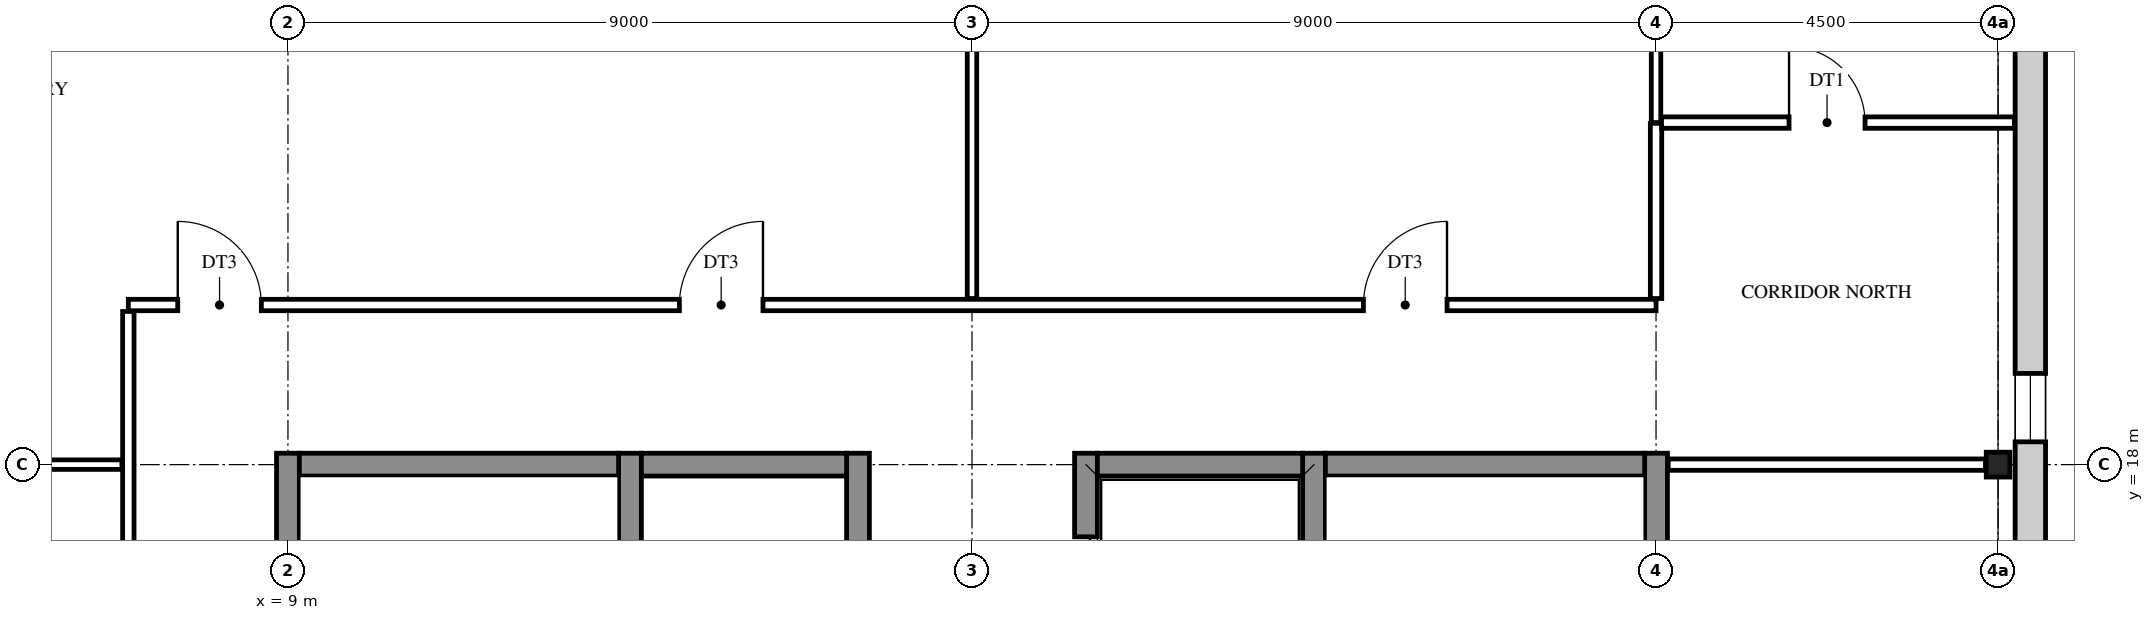
"""IFC4 building model, lengths in metres.
Left out: names, types, materials, properties, quantities, classifications, styles, units other than length and angle.
Written with IfcOpenShell. Run it as: python <this file> out.ifc"""

import sys

from ifc_helpers import new_model, si_unit, direction, frame, frame_2d, origin, origin_2d, place, context, subcontext, project, spatial, rectangle, i_section, extrude, element, fill, save


model = new_model("IFC4")
c1 = context("Model", 3, precision=1e-05, world=origin(), true_north=direction((0.0, 1.0)))
c2 = subcontext(c1, "Body", "Model", "MODEL_VIEW")
j1 = project(units=[si_unit("LENGTHUNIT", "METRE"), si_unit("PLANEANGLEUNIT", "RADIAN")], contexts=[c1])
p1 = place(None, origin())
s1 = spatial("IfcSite", under=j1, at=p1, CompositionType="ELEMENT")
p2 = place(p1, origin())
s2 = spatial("IfcBuilding", under=s1, at=p2, CompositionType="ELEMENT")
p3 = place(p2, frame((0.0, 0.0, 40.2)))
s3 = spatial("IfcBuildingStorey", under=s2, at=p3, CompositionType="ELEMENT", Elevation=40.2)
p4 = place(p3, frame((31.5, 18.0, 0.0), z_axis=(0.0, 0.0, 1.0), x_axis=(1.0, 0.0, 0.0)))
e1 = element("IfcColumn", 1, at=p4, inside=s3, PredefinedType="COLUMN", context=c2, shape_type="SweptSolid", body=[
    extrude(i_section(OverallWidth=0.311, OverallDepth=0.327, WebThickness=0.016, FlangeThickness=0.025, FilletRadius=0.017, at=origin_2d()), origin(), (0.0, 0.0, 1.0), 4.2),
])
for number, where, z_axis, x_axis in (
    (2, (9.0, 8.85, 0.0), (0.0, 0.0, 1.0), (0.0, 1.0, 0.0)),
    (3, (13.5, 8.85, 0.0), (0.0, 0.0, 1.0), (0.0, 1.0, 0.0)),
):
    element("IfcWall", number, at=place(p3, frame(where, z_axis=z_axis, x_axis=x_axis)), inside=s3, PredefinedType="SHEAR", context=c2, shape_type="SweptSolid", body=[
        extrude(rectangle(XDim=9.3, YDim=0.3, at=frame_2d((4.65, 0.0))), origin(), (0.0, 0.0, 1.0), 4.2),
    ])
p5 = place(p3, frame((16.5, 8.85, 0.0), z_axis=(0.0, 0.0, 1.0), x_axis=(0.0, 1.0, 0.0)))
e4 = element("IfcWall", 4, at=p5, inside=s3, PredefinedType="SHEAR", context=c2, shape_type="SweptSolid", body=[
    extrude(rectangle(XDim=9.3, YDim=0.3, at=frame_2d((4.65, 0.0))), origin(), (0.0, 0.0, 1.0), 4.2),
])
p6 = place(p5, frame((1.1, 0.0, 0.0)))
e5 = element("IfcOpeningElement", 5, at=p6, cuts=e4, PredefinedType="OPENING", context=c2, shape_type="SweptSolid", body=[
    extrude(rectangle(XDim=1.1, YDim=2.1, at=frame_2d((0.55, 1.05))), frame((0.0, 0.16, 0.0), z_axis=(0.0, -1.0, 0.0), x_axis=(1.0, 0.0, 0.0)), (0.0, 0.0, 1.0), 0.32),
])
p7 = place(p5, frame((4.1, 0.0, 0.0)))
e6 = element("IfcOpeningElement", 6, at=p7, cuts=e4, PredefinedType="OPENING", context=c2, shape_type="SweptSolid", body=[
    extrude(rectangle(XDim=1.1, YDim=2.1, at=frame_2d((0.55, 1.05))), frame((0.0, 0.16, 0.0), z_axis=(0.0, -1.0, 0.0), x_axis=(1.0, 0.0, 0.0)), (0.0, 0.0, 1.0), 0.32),
])
p8 = place(p3, frame((19.5, 8.85, 0.0), z_axis=(0.0, 0.0, 1.0), x_axis=(0.0, 1.0, 0.0)))
e7 = element("IfcWall", 7, at=p8, inside=s3, PredefinedType="SHEAR", context=c2, shape_type="SweptSolid", body=[
    extrude(rectangle(XDim=9.3, YDim=0.3, at=frame_2d((4.65, 0.0))), origin(), (0.0, 0.0, 1.0), 4.2),
])
p9 = place(p8, frame((3.95, 0.0, 0.0)))
e8 = element("IfcOpeningElement", 8, at=p9, cuts=e7, PredefinedType="OPENING", context=c2, shape_type="SweptSolid", body=[
    extrude(rectangle(XDim=1.4, YDim=2.1, at=frame_2d((0.7, 1.05))), frame((0.0, 0.16, 0.0), z_axis=(0.0, -1.0, 0.0), x_axis=(1.0, 0.0, 0.0)), (0.0, 0.0, 1.0), 0.32),
])
p10 = place(p8, frame((7.1, 0.0, 0.0)))
e9 = element("IfcOpeningElement", 9, at=p10, cuts=e7, PredefinedType="OPENING", context=c2, shape_type="SweptSolid", body=[
    extrude(rectangle(XDim=1.1, YDim=2.1, at=frame_2d((0.55, 1.05))), frame((0.0, 0.16, 0.0), z_axis=(0.0, -1.0, 0.0), x_axis=(1.0, 0.0, 0.0)), (0.0, 0.0, 1.0), 0.32),
])
for number, where, z_axis, x_axis in (
    (10, (22.5, 8.85, 0.0), (0.0, 0.0, 1.0), (0.0, 1.0, 0.0)),
    (11, (27.0, 8.85, 0.0), (0.0, 0.0, 1.0), (0.0, 1.0, 0.0)),
):
    element("IfcWall", number, at=place(p3, frame(where, z_axis=z_axis, x_axis=x_axis)), inside=s3, PredefinedType="SHEAR", context=c2, shape_type="SweptSolid", body=[
        extrude(rectangle(XDim=9.3, YDim=0.3, at=frame_2d((4.65, 0.0))), origin(), (0.0, 0.0, 1.0), 4.2),
    ])
p11 = place(p3, frame((9.15, 18.0, 0.0), z_axis=(0.0, 0.0, 1.0), x_axis=(1.0, 0.0, 0.0)))
e12 = element("IfcWall", 12, at=p11, inside=s3, PredefinedType="SHEAR", context=c2, shape_type="SweptSolid", body=[
    extrude(rectangle(XDim=4.2, YDim=0.3, at=frame_2d((2.1, 0.0))), origin(), (0.0, 0.0, 1.0), 4.2),
])
for number, where, z_axis, x_axis in (
    (13, (13.65, 18.0, 0.0), (0.0, 0.0, 1.0), (1.0, 0.0, 0.0)),
    (14, (19.65, 18.0, 0.0), (0.0, 0.0, 1.0), (1.0, 0.0, 0.0)),
):
    element("IfcWall", number, at=place(p3, frame(where, z_axis=z_axis, x_axis=x_axis)), inside=s3, PredefinedType="SHEAR", context=c2, shape_type="SweptSolid", body=[
        extrude(rectangle(XDim=2.7, YDim=0.3, at=frame_2d((1.35, 0.0))), origin(), (0.0, 0.0, 1.0), 4.2),
    ])
p12 = place(p3, frame((22.65, 18.0, 0.0), z_axis=(0.0, 0.0, 1.0), x_axis=(1.0, 0.0, 0.0)))
e15 = element("IfcWall", 15, at=p12, inside=s3, PredefinedType="SHEAR", context=c2, shape_type="SweptSolid", body=[
    extrude(rectangle(XDim=4.2, YDim=0.3, at=frame_2d((2.1, 0.0))), origin(), (0.0, 0.0, 1.0), 4.2),
])
p13 = place(p3, frame((31.925, 27.225, 0.0), z_axis=(0.0, 0.0, 1.0), x_axis=(0.0, -1.0, 0.0)))
e16 = element("IfcWall", 16, at=p13, inside=s3, PredefinedType="STANDARD", context=c2, shape_type="SweptSolid", body=[
    extrude(rectangle(XDim=27.45, YDim=0.4, at=frame_2d((13.725, 0.0))), origin(), (0.0, 0.0, 1.0), 4.2),
])
p14 = place(p13, frame((26.025, 0.0, 0.9)))
e17 = element("IfcOpeningElement", 17, at=p14, cuts=e16, PredefinedType="OPENING", context=c2, shape_type="SweptSolid", body=[
    extrude(rectangle(XDim=0.9, YDim=2.0, at=frame_2d((0.45, 1.0))), frame((0.0, 0.21, 0.0), z_axis=(0.0, -1.0, 0.0), x_axis=(1.0, 0.0, 0.0)), (0.0, 0.0, 1.0), 0.42),
])
p15 = place(p13, frame((18.525, 0.0, 0.9)))
e18 = element("IfcOpeningElement", 18, at=p15, cuts=e16, PredefinedType="OPENING", context=c2, shape_type="SweptSolid", body=[
    extrude(rectangle(XDim=0.9, YDim=2.0, at=frame_2d((0.45, 1.0))), frame((0.0, 0.21, 0.0), z_axis=(0.0, -1.0, 0.0), x_axis=(1.0, 0.0, 0.0)), (0.0, 0.0, 1.0), 0.42),
])
p16 = place(p13, frame((15.675, 0.0, 1.6)))
e19 = element("IfcOpeningElement", 19, at=p16, cuts=e16, PredefinedType="OPENING", context=c2, shape_type="SweptSolid", body=[
    extrude(rectangle(XDim=0.6, YDim=0.9, at=frame_2d((0.3, 0.45))), frame((0.0, 0.21, 0.0), z_axis=(0.0, -1.0, 0.0), x_axis=(1.0, 0.0, 0.0)), (0.0, 0.0, 1.0), 0.42),
])
p17 = place(p13, frame((11.175, 0.0, 1.6)))
e20 = element("IfcOpeningElement", 20, at=p17, cuts=e16, PredefinedType="OPENING", context=c2, shape_type="SweptSolid", body=[
    extrude(rectangle(XDim=0.6, YDim=0.9, at=frame_2d((0.3, 0.45))), frame((0.0, 0.21, 0.0), z_axis=(0.0, -1.0, 0.0), x_axis=(1.0, 0.0, 0.0)), (0.0, 0.0, 1.0), 0.42),
])
p18 = place(p13, frame((8.025, 0.0, 0.9)))
e21 = element("IfcOpeningElement", 21, at=p18, cuts=e16, PredefinedType="OPENING", context=c2, shape_type="SweptSolid", body=[
    extrude(rectangle(XDim=0.9, YDim=2.0, at=frame_2d((0.45, 1.0))), frame((0.0, 0.21, 0.0), z_axis=(0.0, -1.0, 0.0), x_axis=(1.0, 0.0, 0.0)), (0.0, 0.0, 1.0), 0.42),
])
p19 = place(p13, frame((0.525, 0.0, 0.9)))
e22 = element("IfcOpeningElement", 22, at=p19, cuts=e16, PredefinedType="OPENING", context=c2, shape_type="SweptSolid", body=[
    extrude(rectangle(XDim=0.9, YDim=2.0, at=frame_2d((0.45, 1.0))), frame((0.0, 0.21, 0.0), z_axis=(0.0, -1.0, 0.0), x_axis=(1.0, 0.0, 0.0)), (0.0, 0.0, 1.0), 0.42),
])
p20 = place(p3, frame((6.9, 6.985, 0.0), z_axis=(0.0, 0.0, 1.0), x_axis=(0.0, 1.0, 0.0)))
e23 = element("IfcWall", 23, at=p20, inside=s3, PredefinedType="PARTITIONING", context=c2, shape_type="SweptSolid", body=[
    extrude(rectangle(XDim=13.03, YDim=0.15, at=frame_2d((6.515, 0.0))), origin(), (0.0, 0.0, 1.0), 3.537),
])
p21 = place(p20, frame((0.465, 0.0, 0.0)))
e24 = element("IfcOpeningElement", 24, at=p21, cuts=e23, PredefinedType="OPENING", context=c2, shape_type="SweptSolid", body=[
    extrude(rectangle(XDim=1.0, YDim=2.1, at=frame_2d((0.5, 1.05))), frame((0.0, 0.085, 0.0), z_axis=(0.0, -1.0, 0.0), x_axis=(1.0, 0.0, 0.0)), (0.0, 0.0, 1.0), 0.17),
])
p22 = place(p20, frame((3.715, 0.0, 0.0)))
e25 = element("IfcOpeningElement", 25, at=p22, cuts=e23, PredefinedType="OPENING", context=c2, shape_type="SweptSolid", body=[
    extrude(rectangle(XDim=1.1, YDim=2.1, at=frame_2d((0.55, 1.05))), frame((0.0, 0.085, 0.0), z_axis=(0.0, -1.0, 0.0), x_axis=(1.0, 0.0, 0.0)), (0.0, 0.0, 1.0), 0.17),
])
p23 = place(p20, frame((8.265, 0.0, 0.0)))
e26 = element("IfcOpeningElement", 26, at=p23, cuts=e23, PredefinedType="OPENING", context=c2, shape_type="SweptSolid", body=[
    extrude(rectangle(XDim=1.0, YDim=2.1, at=frame_2d((0.5, 1.05))), frame((0.0, 0.085, 0.0), z_axis=(0.0, -1.0, 0.0), x_axis=(1.0, 0.0, 0.0)), (0.0, 0.0, 1.0), 0.17),
])
p24 = place(p3, frame((18.0, 20.185, 0.0), z_axis=(0.0, 0.0, 1.0), x_axis=(0.0, 1.0, 0.0)))
e27 = element("IfcWall", 27, at=p24, inside=s3, PredefinedType="PARTITIONING", context=c2, shape_type="SweptSolid", body=[
    extrude(rectangle(XDim=6.641, YDim=0.125, at=frame_2d((3.321, 0.0))), origin(), (0.0, 0.0, 1.0), 3.537),
])
p25 = place(p3, frame((27.0, 20.185, 0.0), z_axis=(0.0, 0.0, 1.0), x_axis=(0.0, 1.0, 0.0)))
e28 = element("IfcWall", 28, at=p25, inside=s3, PredefinedType="PARTITIONING", context=c2, shape_type="SweptSolid", body=[
    extrude(rectangle(XDim=2.305, YDim=0.15, at=frame_2d((1.152, 0.0))), origin(), (0.0, 0.0, 1.0), 3.537),
])
p26 = place(p3, frame((27.0, 22.5, 0.0), z_axis=(0.0, 0.0, 1.0), x_axis=(0.0, 1.0, 0.0)))
e29 = element("IfcWall", 29, at=p26, inside=s3, PredefinedType="PARTITIONING", context=c2, shape_type="SweptSolid", body=[
    extrude(rectangle(XDim=4.326, YDim=0.125, at=frame_2d((2.163, 0.0))), origin(), (0.0, 0.0, 1.0), 3.537),
])
p27 = place(p3, frame((0.166, 18.0, 0.0), z_axis=(0.0, 0.0, 1.0), x_axis=(1.0, 0.0, 0.0)))
e30 = element("IfcWall", 30, at=p27, inside=s3, PredefinedType="PARTITIONING", context=c2, shape_type="SweptSolid", body=[
    extrude(rectangle(XDim=6.649, YDim=0.125, at=frame_2d((3.325, 0.0))), origin(), (0.0, 0.0, 1.0), 3.537),
])
p28 = place(p3, frame((27.16, 18.0, 0.0), z_axis=(0.0, 0.0, 1.0), x_axis=(1.0, 0.0, 0.0)))
e31 = element("IfcWall", 31, at=p28, inside=s3, PredefinedType="PARTITIONING", context=c2, shape_type="SweptSolid", body=[
    extrude(rectangle(XDim=4.175, YDim=0.15, at=frame_2d((2.087, 0.0))), origin(), (0.0, 0.0, 1.0), 3.537),
])
p29 = place(p3, frame((6.9, 20.1, 0.0), z_axis=(0.0, 0.0, 1.0), x_axis=(1.0, 0.0, 0.0)))
e32 = element("IfcWall", 32, at=p29, inside=s3, PredefinedType="PARTITIONING", context=c2, shape_type="SweptSolid", body=[
    extrude(rectangle(XDim=20.1, YDim=0.15, at=frame_2d((10.05, 0.0))), origin(), (0.0, 0.0, 1.0), 3.537),
])
p30 = place(p29, frame((7.25, 0.0, 0.0)))
e33 = element("IfcOpeningElement", 33, at=p30, cuts=e32, PredefinedType="OPENING", context=c2, shape_type="SweptSolid", body=[
    extrude(rectangle(XDim=1.1, YDim=2.1, at=frame_2d((0.55, 1.05))), frame((0.0, 0.085, 0.0), z_axis=(0.0, -1.0, 0.0), x_axis=(1.0, 0.0, 0.0)), (0.0, 0.0, 1.0), 0.17),
])
p31 = place(p29, frame((0.65, 0.0, 0.0)))
e34 = element("IfcOpeningElement", 34, at=p31, cuts=e32, PredefinedType="OPENING", context=c2, shape_type="SweptSolid", body=[
    extrude(rectangle(XDim=1.1, YDim=2.1, at=frame_2d((0.55, 1.05))), frame((0.0, 0.085, 0.0), z_axis=(0.0, -1.0, 0.0), x_axis=(1.0, 0.0, 0.0)), (0.0, 0.0, 1.0), 0.17),
])
p32 = place(p29, frame((16.25, 0.0, 0.0)))
e35 = element("IfcOpeningElement", 35, at=p32, cuts=e32, PredefinedType="OPENING", context=c2, shape_type="SweptSolid", body=[
    extrude(rectangle(XDim=1.1, YDim=2.1, at=frame_2d((0.55, 1.05))), frame((0.0, 0.085, 0.0), z_axis=(0.0, -1.0, 0.0), x_axis=(1.0, 0.0, 0.0)), (0.0, 0.0, 1.0), 0.17),
])
p33 = place(p3, frame((27.073, 22.5, 0.0), z_axis=(0.0, 0.0, 1.0), x_axis=(1.0, 0.0, 0.0)))
e36 = element("IfcWall", 36, at=p33, inside=s3, PredefinedType="PARTITIONING", context=c2, shape_type="SweptSolid", body=[
    extrude(rectangle(XDim=4.643, YDim=0.15, at=frame_2d((2.321, 0.0))), origin(), (0.0, 0.0, 1.0), 3.537),
])
p34 = place(p33, frame((1.677, 0.0, 0.0)))
e37 = element("IfcOpeningElement", 37, at=p34, cuts=e36, PredefinedType="OPENING", context=c2, shape_type="SweptSolid", body=[
    extrude(rectangle(XDim=1.0, YDim=2.1, at=frame_2d((0.5, 1.05))), frame((0.0, 0.085, 0.0), z_axis=(0.0, -1.0, 0.0), x_axis=(1.0, 0.0, 0.0)), (0.0, 0.0, 1.0), 0.17),
])
p35 = place(p18, origin())
e38 = element("IfcWindow", 38, at=p35, inside=s3, PartitioningType="SINGLE_PANEL", PredefinedType="WINDOW", context=c2, shape_type="SweptSolid", body=[
    extrude(rectangle(XDim=0.9, YDim=2.0, at=frame_2d((0.45, 1.0))), frame((0.0, 0.03, 0.0), z_axis=(0.0, -1.0, 0.0), x_axis=(1.0, 0.0, 0.0)), (0.0, 0.0, 1.0), 0.06),
])
fill(e21, e38)
p36 = place(p30, origin())
e39 = element("IfcDoor", 39, at=p36, inside=s3, OperationType="SINGLE_SWING_RIGHT", PredefinedType="DOOR", context=c2, shape_type="SweptSolid", body=[
    extrude(rectangle(XDim=1.1, YDim=2.1, at=frame_2d((0.55, 1.05))), frame((0.0, 0.025, 0.0), z_axis=(0.0, -1.0, 0.0), x_axis=(1.0, 0.0, 0.0)), (0.0, 0.0, 1.0), 0.05),
])
fill(e33, e39)
p37 = place(p31, origin())
e40 = element("IfcDoor", 40, at=p37, inside=s3, OperationType="SINGLE_SWING_LEFT", PredefinedType="DOOR", context=c2, shape_type="SweptSolid", body=[
    extrude(rectangle(XDim=1.1, YDim=2.1, at=frame_2d((0.55, 1.05))), frame((0.0, 0.025, 0.0), z_axis=(0.0, -1.0, 0.0), x_axis=(1.0, 0.0, 0.0)), (0.0, 0.0, 1.0), 0.05),
])
fill(e34, e40)
p38 = place(p32, origin())
e41 = element("IfcDoor", 41, at=p38, inside=s3, OperationType="SINGLE_SWING_RIGHT", PredefinedType="DOOR", context=c2, shape_type="SweptSolid", body=[
    extrude(rectangle(XDim=1.1, YDim=2.1, at=frame_2d((0.55, 1.05))), frame((0.0, 0.025, 0.0), z_axis=(0.0, -1.0, 0.0), x_axis=(1.0, 0.0, 0.0)), (0.0, 0.0, 1.0), 0.05),
])
fill(e35, e41)
p39 = place(p34, origin())
e42 = element("IfcDoor", 42, at=p39, inside=s3, OperationType="SINGLE_SWING_LEFT", PredefinedType="DOOR", context=c2, shape_type="SweptSolid", body=[
    extrude(rectangle(XDim=1.0, YDim=2.1, at=frame_2d((0.5, 1.05))), frame((0.0, 0.025, 0.0), z_axis=(0.0, -1.0, 0.0), x_axis=(1.0, 0.0, 0.0)), (0.0, 0.0, 1.0), 0.05),
])
fill(e37, e42)
p40 = place(p10, origin())
e43 = element("IfcDoor", 43, at=p40, inside=s3, OperationType="DOUBLE_DOOR_SLIDING", PredefinedType="DOOR", context=c2, shape_type="SweptSolid", body=[
    extrude(rectangle(XDim=1.1, YDim=2.1, at=frame_2d((0.55, 1.05))), frame((0.0, 0.025, 0.0), z_axis=(0.0, -1.0, 0.0), x_axis=(1.0, 0.0, 0.0)), (0.0, 0.0, 1.0), 0.05),
])
fill(e9, e43)
save(model, sys.argv[1])
